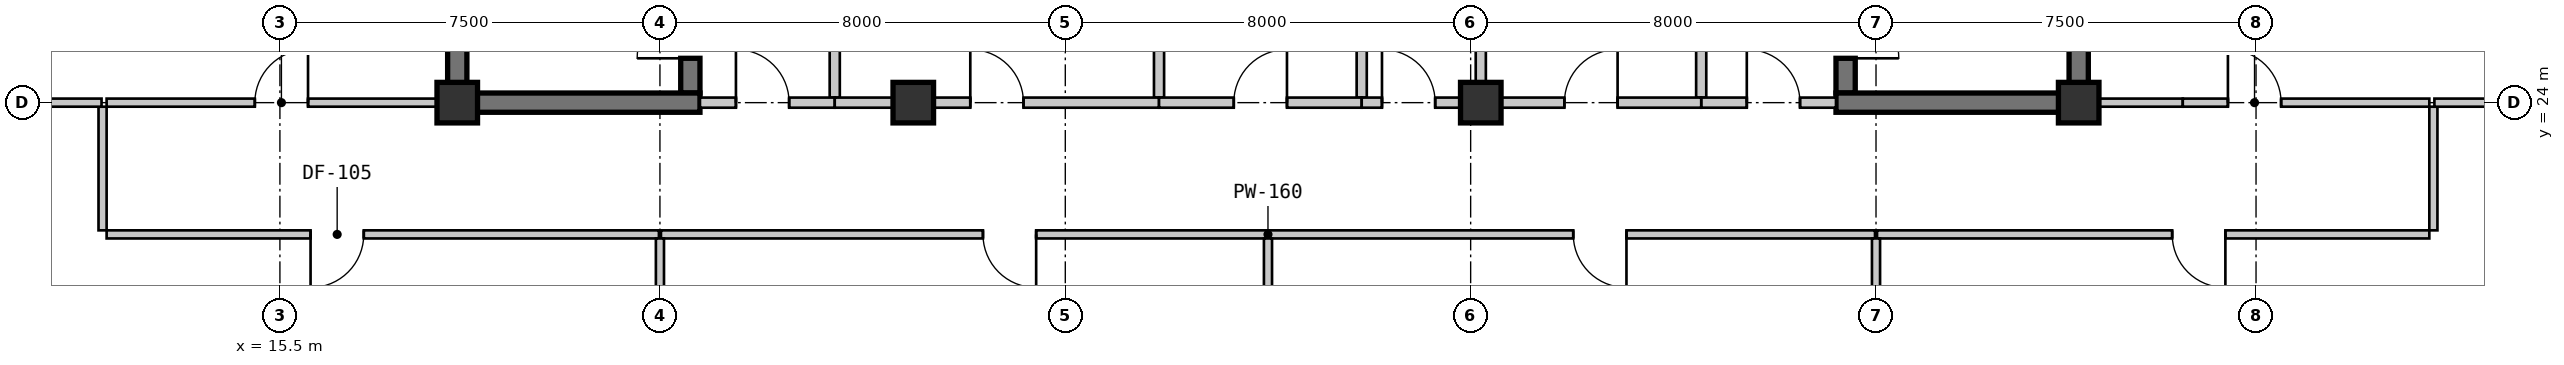
"""IFC4 building model, lengths in metres.
Left out: names, types, materials, properties, quantities, classifications, styles, units other than length and angle.
Written with IfcOpenShell. Run it as: python <this file> out.ifc"""

import sys

from ifc_helpers import new_model, si_unit, direction, frame, frame_2d, origin, origin_2d, place, context, subcontext, project, spatial, rectangle, extrude, source, transform, mapped, element, fill, save


model = new_model("IFC4")
c1 = context("Model", 3, precision=1e-05, world=origin(), true_north=direction((0.0, 1.0)))
c2 = subcontext(c1, "Body", "Model", "MODEL_VIEW")
j1 = project(units=[si_unit("LENGTHUNIT", "METRE"), si_unit("PLANEANGLEUNIT", "RADIAN")], contexts=[c1])
p1 = place(None, origin())
s1 = spatial("IfcSite", under=j1, at=p1, CompositionType="ELEMENT")
p2 = place(p1, origin())
s2 = spatial("IfcBuilding", under=s1, at=p2, CompositionType="ELEMENT")
p3 = place(p2, frame((0.0, 0.0, 60.9)))
s3 = spatial("IfcBuildingStorey", under=s2, at=p3, CompositionType="ELEMENT", Elevation=60.9)
m1 = source(origin(), c2, "Body", "SweptSolid", [
    extrude(rectangle(XDim=0.8, YDim=0.8, at=origin_2d()), origin(), (0.0, 0.0, 1.0), 4.2),
])
for number, where, z_axis, x_axis in (
    (1, (19.0, 24.0, 0.0), (0.0, 0.0, 1.0), (1.0, 0.0, 0.0)),
    (2, (28.0, 24.0, 0.0), (0.0, 0.0, 1.0), (1.0, 0.0, 0.0)),
    (3, (39.2, 24.0, 0.0), (0.0, 0.0, 1.0), (1.0, 0.0, 0.0)),
    (4, (51.0, 24.0, 0.0), (0.0, 0.0, 1.0), (1.0, 0.0, 0.0)),
):
    element("IfcColumn", number, at=place(p3, frame(where, z_axis=z_axis, x_axis=x_axis)), inside=s3, PredefinedType="COLUMN", context=c2, shape_type="MappedRepresentation", body=[
        mapped(m1, transform((0.0, 0.0, 0.0), scale=1.0)),
    ])
m2 = source(origin(), c2, "Body", "SweptSolid", [
    extrude(rectangle(XDim=4.01, YDim=0.38, at=frame_2d((2.005, 0.0))), origin(), (0.0, 0.0, 1.0), 3.78),
])
for number, where, z_axis, x_axis in (
    (5, (19.0, 24.19, 0.0), (0.0, 0.0, 1.0), (0.0, 1.0, 0.0)),
    (6, (51.0, 24.19, 0.0), (0.0, 0.0, 1.0), (0.0, 1.0, 0.0)),
):
    element("IfcWall", number, at=place(p3, frame(where, z_axis=z_axis, x_axis=x_axis)), inside=s3, PredefinedType="SHEAR", context=c2, shape_type="MappedRepresentation", body=[
        mapped(m2, transform((0.0, 0.0, 0.0), scale=1.0)),
    ])
m3 = source(origin(), c2, "Body", "SweptSolid", [
    extrude(rectangle(XDim=3.82, YDim=0.38, at=frame_2d((1.91, 0.0))), origin(), (0.0, 0.0, 1.0), 3.78),
])
p4 = place(p3, frame((23.6, 24.19, 0.0), z_axis=(0.0, 0.0, 1.0), x_axis=(0.0, 1.0, 0.0)))
e7 = element("IfcWall", 7, at=p4, inside=s3, PredefinedType="SHEAR", context=c2, shape_type="MappedRepresentation", body=[
    mapped(m3, transform((0.0, 0.0, 0.0), scale=1.0)),
])
m4 = source(origin(), c2, "Body", "SweptSolid", [
    extrude(rectangle(XDim=1.05, YDim=2.1, at=frame_2d((0.525, 1.05))), frame((0.0, 0.2, 0.0), z_axis=(0.0, -1.0, 0.0), x_axis=(1.0, 0.0, 0.0)), (0.0, 0.0, 1.0), 0.4),
])
p5 = place(p4, frame((0.685, 0.0, 0.0)))
e8 = element("IfcOpeningElement", 8, at=p5, cuts=e7, PredefinedType="OPENING", context=c2, shape_type="MappedRepresentation", body=[
    mapped(m4, transform((0.0, 0.0, 0.0), scale=1.0)),
])
m5 = source(origin(), c2, "Body", "SweptSolid", [
    extrude(rectangle(XDim=4.98, YDim=0.38, at=frame_2d((2.49, 0.0))), origin(), (0.0, 0.0, 1.0), 3.78),
])
p6 = place(p3, frame((18.81, 24.0, 0.0), z_axis=(0.0, 0.0, 1.0), x_axis=(1.0, 0.0, 0.0)))
e9 = element("IfcWall", 9, at=p6, inside=s3, PredefinedType="SHEAR", context=c2, shape_type="MappedRepresentation", body=[
    mapped(m5, transform((0.0, 0.0, 0.0), scale=1.0)),
])
m6 = source(origin(), c2, "Body", "SweptSolid", [
    extrude(rectangle(XDim=3.91, YDim=0.2, at=frame_2d((1.955, 0.0))), origin(), (0.0, 0.0, 1.0), 3.78),
])
p7 = place(p3, frame((26.45, 24.1, 0.0), z_axis=(0.0, 0.0, 1.0), x_axis=(0.0, 1.0, 0.0)))
e10 = element("IfcWall", 10, at=p7, inside=s3, PredefinedType="SOLIDWALL", context=c2, shape_type="MappedRepresentation", body=[
    mapped(m6, transform((0.0, 0.0, 0.0), scale=1.0)),
])
m7 = source(origin(), c2, "Body", "SweptSolid", [
    extrude(rectangle(XDim=2.66, YDim=0.2, at=frame_2d((1.33, 0.0))), origin(), (0.0, 0.0, 1.0), 3.32),
])
p8 = place(p3, frame((23.79, 24.0, 0.0), z_axis=(0.0, 0.0, 1.0), x_axis=(1.0, 0.0, 0.0)))
e11 = element("IfcWall", 11, at=p8, inside=s3, PredefinedType="SOLIDWALL", context=c2, shape_type="MappedRepresentation", body=[
    mapped(m7, transform((0.0, 0.0, 0.0), scale=1.0)),
])
m8 = source(origin(), c2, "Body", "SweptSolid", [
    extrude(rectangle(XDim=1.05, YDim=2.1, at=frame_2d((0.525, 1.05))), frame((0.0, 0.11, 0.0), z_axis=(0.0, -1.0, 0.0), x_axis=(1.0, 0.0, 0.0)), (0.0, 0.0, 1.0), 0.22),
])
p9 = place(p8, frame((0.71, 0.0, 0.0)))
e12 = element("IfcOpeningElement", 12, at=p9, cuts=e11, PredefinedType="OPENING", context=c2, shape_type="MappedRepresentation", body=[
    mapped(m8, transform((0.0, 0.0, 0.0), scale=1.0)),
])
p10 = place(p3, frame((46.4, 28.01, 0.0), z_axis=(0.0, 0.0, 1.0), x_axis=(0.0, -1.0, 0.0)))
e13 = element("IfcWall", 13, at=p10, inside=s3, PredefinedType="SHEAR", context=c2, shape_type="MappedRepresentation", body=[
    mapped(m3, transform((0.0, 0.0, 0.0), scale=1.0)),
])
p11 = place(p10, frame((2.085, 0.0, 0.0)))
e14 = element("IfcOpeningElement", 14, at=p11, cuts=e13, PredefinedType="OPENING", context=c2, shape_type="MappedRepresentation", body=[
    mapped(m4, transform((0.0, 0.0, 0.0), scale=1.0)),
])
p12 = place(p3, frame((46.21, 24.0, 0.0), z_axis=(0.0, 0.0, 1.0), x_axis=(1.0, 0.0, 0.0)))
e15 = element("IfcWall", 15, at=p12, inside=s3, PredefinedType="SHEAR", context=c2, shape_type="MappedRepresentation", body=[
    mapped(m5, transform((0.0, 0.0, 0.0), scale=1.0)),
])
p13 = place(p3, frame((43.55, 28.01, 0.0), z_axis=(0.0, 0.0, 1.0), x_axis=(0.0, -1.0, 0.0)))
e16 = element("IfcWall", 16, at=p13, inside=s3, PredefinedType="SOLIDWALL", context=c2, shape_type="MappedRepresentation", body=[
    mapped(m6, transform((0.0, 0.0, 0.0), scale=1.0)),
])
m9 = source(origin(), c2, "Body", "SweptSolid", [
    extrude(rectangle(XDim=2.66, YDim=0.2, at=frame_2d((1.33, 0.0))), origin(), (0.0, 0.0, 1.0), 3.247),
])
p14 = place(p3, frame((43.55, 24.0, 0.0), z_axis=(0.0, 0.0, 1.0), x_axis=(1.0, 0.0, 0.0)))
e17 = element("IfcWall", 17, at=p14, inside=s3, PredefinedType="SOLIDWALL", context=c2, shape_type="MappedRepresentation", body=[
    mapped(m9, transform((0.0, 0.0, 0.0), scale=1.0)),
])
p15 = place(p14, frame((0.9, 0.0, 0.0)))
e18 = element("IfcOpeningElement", 18, at=p15, cuts=e17, PredefinedType="OPENING", context=c2, shape_type="MappedRepresentation", body=[
    mapped(m8, transform((0.0, 0.0, 0.0), scale=1.0)),
])
p16 = place(p3, frame((32.85, 28.01, 0.0), z_axis=(0.0, 0.0, 1.0), x_axis=(0.0, -1.0, 0.0)))
e19 = element("IfcWall", 19, at=p16, inside=s3, PredefinedType="SOLIDWALL", context=c2, shape_type="MappedRepresentation", body=[
    mapped(m6, transform((0.0, 0.0, 0.0), scale=1.0)),
])
m10 = source(origin(), c2, "Body", "SweptSolid", [
    extrude(rectangle(XDim=6.4, YDim=0.2, at=frame_2d((3.2, 0.0))), origin(), (0.0, 0.0, 1.0), 3.32),
])
p17 = place(p3, frame((32.85, 24.0, 0.0), z_axis=(0.0, 0.0, 1.0), x_axis=(-1.0, 0.0, 0.0)))
e20 = element("IfcWall", 20, at=p17, inside=s3, PredefinedType="SOLIDWALL", context=c2, shape_type="MappedRepresentation", body=[
    mapped(m10, transform((0.0, 0.0, 0.0), scale=1.0)),
])
p18 = place(p17, frame((2.675, 0.0, 0.0)))
e21 = element("IfcOpeningElement", 21, at=p18, cuts=e20, PredefinedType="OPENING", context=c2, shape_type="MappedRepresentation", body=[
    mapped(m8, transform((0.0, 0.0, 0.0), scale=1.0)),
])
p19 = place(p3, frame((36.85, 28.01, 0.0), z_axis=(0.0, 0.0, 1.0), x_axis=(0.0, -1.0, 0.0)))
e22 = element("IfcWall", 22, at=p19, inside=s3, PredefinedType="SOLIDWALL", context=c2, shape_type="MappedRepresentation", body=[
    mapped(m6, transform((0.0, 0.0, 0.0), scale=1.0)),
])
m11 = source(origin(), c2, "Body", "SweptSolid", [
    extrude(rectangle(XDim=4.0, YDim=0.2, at=frame_2d((2.0, 0.0))), origin(), (0.0, 0.0, 1.0), 3.32),
])
p20 = place(p3, frame((36.85, 24.0, 0.0), z_axis=(0.0, 0.0, 1.0), x_axis=(-1.0, 0.0, 0.0)))
e23 = element("IfcWall", 23, at=p20, inside=s3, PredefinedType="SOLIDWALL", context=c2, shape_type="MappedRepresentation", body=[
    mapped(m11, transform((0.0, 0.0, 0.0), scale=1.0)),
])
p21 = place(p20, frame((1.475, 0.0, 0.0)))
e24 = element("IfcOpeningElement", 24, at=p21, cuts=e23, PredefinedType="OPENING", context=c2, shape_type="MappedRepresentation", body=[
    mapped(m8, transform((0.0, 0.0, 0.0), scale=1.0)),
])
m12 = source(origin(), c2, "Body", "SweptSolid", [
    extrude(rectangle(XDim=3.91, YDim=0.2, at=frame_2d((1.955, 0.0))), origin(), (0.0, 0.0, 1.0), 3.32),
])
p22 = place(p3, frame((39.2, 28.01, 0.0), z_axis=(0.0, 0.0, 1.0), x_axis=(0.0, -1.0, 0.0)))
e25 = element("IfcWall", 25, at=p22, inside=s3, PredefinedType="SOLIDWALL", context=c2, shape_type="MappedRepresentation", body=[
    mapped(m12, transform((0.0, 0.0, 0.0), scale=1.0)),
])
m13 = source(origin(), c2, "Body", "SweptSolid", [
    extrude(rectangle(XDim=2.35, YDim=0.2, at=frame_2d((1.175, 0.0))), origin(), (0.0, 0.0, 1.0), 3.32),
])
p23 = place(p3, frame((39.2, 24.0, 0.0), z_axis=(0.0, 0.0, 1.0), x_axis=(-1.0, 0.0, 0.0)))
e26 = element("IfcWall", 26, at=p23, inside=s3, PredefinedType="SOLIDWALL", context=c2, shape_type="MappedRepresentation", body=[
    mapped(m13, transform((0.0, 0.0, 0.0), scale=1.0)),
])
p24 = place(p23, frame((0.9, 0.0, 0.0)))
e27 = element("IfcOpeningElement", 27, at=p24, cuts=e26, PredefinedType="OPENING", context=c2, shape_type="MappedRepresentation", body=[
    mapped(m8, transform((0.0, 0.0, 0.0), scale=1.0)),
])
m14 = source(origin(), c2, "Body", "SweptSolid", [
    extrude(rectangle(XDim=4.35, YDim=0.2, at=frame_2d((2.175, 0.0))), origin(), (0.0, 0.0, 1.0), 3.247),
])
p25 = place(p3, frame((43.55, 24.0, 0.0), z_axis=(0.0, 0.0, 1.0), x_axis=(-1.0, 0.0, 0.0)))
e28 = element("IfcWall", 28, at=p25, inside=s3, PredefinedType="SOLIDWALL", context=c2, shape_type="MappedRepresentation", body=[
    mapped(m14, transform((0.0, 0.0, 0.0), scale=1.0)),
])
p26 = place(p25, frame((1.65, 0.0, 0.0)))
e29 = element("IfcOpeningElement", 29, at=p26, cuts=e28, PredefinedType="OPENING", context=c2, shape_type="MappedRepresentation", body=[
    mapped(m8, transform((0.0, 0.0, 0.0), scale=1.0)),
])
m15 = source(origin(), c2, "Body", "SweptSolid", [
    extrude(rectangle(XDim=6.73, YDim=0.16, at=frame_2d((3.365, 0.0))), origin(), (0.0, 0.0, 1.0), 3.78),
])
p27 = place(p3, frame((12.08, 24.0, 0.0), z_axis=(0.0, 0.0, 1.0), x_axis=(1.0, 0.0, 0.0)))
e30 = element("IfcWall", 30, at=p27, inside=s3, PredefinedType="PARTITIONING", context=c2, shape_type="MappedRepresentation", body=[
    mapped(m15, transform((0.0, 0.0, 0.0), scale=1.0)),
])
m16 = source(origin(), c2, "Body", "SweptSolid", [
    extrude(rectangle(XDim=1.05, YDim=2.1, at=frame_2d((0.525, 1.05))), frame((0.0, 0.09, 0.0), z_axis=(0.0, -1.0, 0.0), x_axis=(1.0, 0.0, 0.0)), (0.0, 0.0, 1.0), 0.18),
])
p28 = place(p27, frame((2.925, 0.0, 0.0)))
e31 = element("IfcOpeningElement", 31, at=p28, cuts=e30, PredefinedType="OPENING", context=c2, shape_type="MappedRepresentation", body=[
    mapped(m16, transform((0.0, 0.0, 0.0), scale=1.0)),
])
m17 = source(origin(), c2, "Body", "SweptSolid", [
    extrude(rectangle(XDim=1.865, YDim=0.16, at=frame_2d((0.932, 0.0))), origin(), (0.0, 0.0, 1.0), 2.28),
])
p29 = place(p3, frame((51.19, 24.0, 0.0), z_axis=(0.0, 0.0, 1.0), x_axis=(1.0, 0.0, 0.0)))
e32 = element("IfcWall", 32, at=p29, inside=s3, PredefinedType="PARTITIONING", context=c2, shape_type="MappedRepresentation", body=[
    mapped(m17, transform((0.0, 0.0, 0.0), scale=1.0)),
])
m18 = source(origin(), c2, "Body", "SweptSolid", [
    extrude(rectangle(XDim=4.865, YDim=0.16, at=frame_2d((2.433, 0.0))), origin(), (0.0, 0.0, 1.0), 3.78),
])
p30 = place(p3, frame((53.054, 24.0, 0.0), z_axis=(0.0, 0.0, 1.0), x_axis=(1.0, 0.0, 0.0)))
e33 = element("IfcWall", 33, at=p30, inside=s3, PredefinedType="PARTITIONING", context=c2, shape_type="MappedRepresentation", body=[
    mapped(m18, transform((0.0, 0.0, 0.0), scale=1.0)),
])
p31 = place(p30, frame((0.891, 0.0, 0.0)))
e34 = element("IfcOpeningElement", 34, at=p31, cuts=e33, PredefinedType="OPENING", context=c2, shape_type="MappedRepresentation", body=[
    mapped(m16, transform((0.0, 0.0, 0.0), scale=1.0)),
])
m19 = source(origin(), c2, "Body", "SweptSolid", [
    extrude(rectangle(XDim=10.9, YDim=0.16, at=frame_2d((5.45, 0.0))), origin(), (0.0, 0.0, 1.0), 3.78),
])
p32 = place(p3, frame((22.98, 21.4, 0.0), z_axis=(0.0, 0.0, 1.0), x_axis=(-1.0, 0.0, 0.0)))
e35 = element("IfcWall", 35, at=p32, inside=s3, PredefinedType="PARTITIONING", context=c2, shape_type="MappedRepresentation", body=[
    mapped(m19, transform((0.0, 0.0, 0.0), scale=1.0)),
])
p33 = place(p32, frame((5.825, 0.0, 0.0)))
e36 = element("IfcOpeningElement", 36, at=p33, cuts=e35, PredefinedType="OPENING", context=c2, shape_type="MappedRepresentation", body=[
    mapped(m16, transform((0.0, 0.0, 0.0), scale=1.0)),
])
m20 = source(origin(), c2, "Body", "SweptSolid", [
    extrude(rectangle(XDim=2.44, YDim=0.16, at=frame_2d((1.22, 0.0))), origin(), (0.0, 0.0, 1.0), 3.78),
])
p34 = place(p3, frame((12.0, 21.48, 0.0), z_axis=(0.0, 0.0, 1.0), x_axis=(0.0, 1.0, 0.0)))
e37 = element("IfcWall", 37, at=p34, inside=s3, PredefinedType="PARTITIONING", context=c2, shape_type="MappedRepresentation", body=[
    mapped(m20, transform((0.0, 0.0, 0.0), scale=1.0)),
])
m21 = source(origin(), c2, "Body", "SweptSolid", [
    extrude(rectangle(XDim=11.959, YDim=0.16, at=frame_2d((5.98, 0.0))), origin(), (0.0, 0.0, 1.0), 3.78),
])
p35 = place(p3, frame((34.98, 21.4, 0.0), z_axis=(0.0, 0.0, 1.0), x_axis=(-1.0, 0.0, 0.0)))
e38 = element("IfcWall", 38, at=p35, inside=s3, PredefinedType="PARTITIONING", context=c2, shape_type="MappedRepresentation", body=[
    mapped(m21, transform((0.0, 0.0, 0.0), scale=1.0)),
])
p36 = place(p35, frame((4.555, 0.0, 0.0)))
e39 = element("IfcOpeningElement", 39, at=p36, cuts=e38, PredefinedType="OPENING", context=c2, shape_type="MappedRepresentation", body=[
    mapped(m16, transform((0.0, 0.0, 0.0), scale=1.0)),
])
p37 = place(p3, frame((46.98, 21.4, 0.0), z_axis=(0.0, 0.0, 1.0), x_axis=(-1.0, 0.0, 0.0)))
e40 = element("IfcWall", 40, at=p37, inside=s3, PredefinedType="PARTITIONING", context=c2, shape_type="MappedRepresentation", body=[
    mapped(m21, transform((0.0, 0.0, 0.0), scale=1.0)),
])
p38 = place(p37, frame((4.905, 0.0, 0.0)))
e41 = element("IfcOpeningElement", 41, at=p38, cuts=e40, PredefinedType="OPENING", context=c2, shape_type="MappedRepresentation", body=[
    mapped(m16, transform((0.0, 0.0, 0.0), scale=1.0)),
])
p39 = place(p3, frame((57.92, 21.4, 0.0), z_axis=(0.0, 0.0, 1.0), x_axis=(-1.0, 0.0, 0.0)))
e42 = element("IfcWall", 42, at=p39, inside=s3, PredefinedType="PARTITIONING", context=c2, shape_type="MappedRepresentation", body=[
    mapped(m19, transform((0.0, 0.0, 0.0), scale=1.0)),
])
p40 = place(p39, frame((4.025, 0.0, 0.0)))
e43 = element("IfcOpeningElement", 43, at=p40, cuts=e42, PredefinedType="OPENING", context=c2, shape_type="MappedRepresentation", body=[
    mapped(m16, transform((0.0, 0.0, 0.0), scale=1.0)),
])
p41 = place(p3, frame((58.0, 23.92, 0.0), z_axis=(0.0, 0.0, 1.0), x_axis=(0.0, -1.0, 0.0)))
e44 = element("IfcWall", 44, at=p41, inside=s3, PredefinedType="PARTITIONING", context=c2, shape_type="MappedRepresentation", body=[
    mapped(m20, transform((0.0, 0.0, 0.0), scale=1.0)),
])
m22 = source(origin(), c2, "Body", "SweptSolid", [
    extrude(rectangle(XDim=6.75, YDim=0.16, at=frame_2d((3.375, 0.0))), origin(), (0.0, 0.0, 1.0), 3.78),
])
for number, where, z_axis, x_axis in (
    (45, (11.98, 24.0, 0.0), (0.0, 0.0, 1.0), (-1.0, 0.0, 0.0)),
    (46, (64.77, 24.0, 0.0), (0.0, 0.0, 1.0), (-1.0, 0.0, 0.0)),
):
    element("IfcWall", number, at=place(p3, frame(where, z_axis=z_axis, x_axis=x_axis)), inside=s3, PredefinedType="PARTITIONING", context=c2, shape_type="MappedRepresentation", body=[
        mapped(m22, transform((0.0, 0.0, 0.0), scale=1.0)),
    ])
m23 = source(origin(), c2, "Body", "SweptSolid", [
    extrude(rectangle(XDim=19.59, YDim=0.16, at=frame_2d((9.795, 0.0))), origin(), (0.0, 0.0, 1.0), 3.78),
])
for number, where, z_axis, x_axis in (
    (47, (23.0, 21.32, 0.0), (0.0, 0.0, 1.0), (0.0, -1.0, 0.0)),
    (48, (35.0, 21.32, 0.0), (0.0, 0.0, 1.0), (0.0, -1.0, 0.0)),
    (49, (47.0, 21.32, 0.0), (0.0, 0.0, 1.0), (0.0, -1.0, 0.0)),
):
    element("IfcWall", number, at=place(p3, frame(where, z_axis=z_axis, x_axis=x_axis)), inside=s3, PredefinedType="PARTITIONING", context=c2, shape_type="MappedRepresentation", body=[
        mapped(m23, transform((0.0, 0.0, 0.0), scale=1.0)),
    ])
m24 = source(origin(), c2, "Body", "SweptSolid", [
    extrude(rectangle(XDim=1.05, YDim=2.1, at=frame_2d((0.525, 1.05))), frame((0.0, 0.025, 0.0), z_axis=(0.0, -1.0, 0.0), x_axis=(1.0, 0.0, 0.0)), (0.0, 0.0, 1.0), 0.05),
])
p42 = place(p5, origin())
e50 = element("IfcDoor", 50, at=p42, inside=s3, OperationType="SINGLE_SWING_LEFT", PredefinedType="DOOR", context=c2, shape_type="MappedRepresentation", body=[
    mapped(m24, transform((0.0, 0.0, 0.0), scale=1.0)),
])
fill(e8, e50)
p43 = place(p9, origin())
e51 = element("IfcDoor", 51, at=p43, inside=s3, OperationType="SINGLE_SWING_LEFT", PredefinedType="DOOR", context=c2, shape_type="MappedRepresentation", body=[
    mapped(m24, transform((0.0, 0.0, 0.0), scale=1.0)),
])
fill(e12, e51)
p44 = place(p11, origin())
e52 = element("IfcDoor", 52, at=p44, inside=s3, OperationType="SINGLE_SWING_RIGHT", PredefinedType="DOOR", context=c2, shape_type="MappedRepresentation", body=[
    mapped(m24, transform((0.0, 0.0, 0.0), scale=1.0)),
])
fill(e14, e52)
p45 = place(p15, origin())
e53 = element("IfcDoor", 53, at=p45, inside=s3, OperationType="SINGLE_SWING_LEFT", PredefinedType="DOOR", context=c2, shape_type="MappedRepresentation", body=[
    mapped(m24, transform((0.0, 0.0, 0.0), scale=1.0)),
])
fill(e18, e53)
p46 = place(p18, frame((1.05, 0.0, 0.0), z_axis=(0.0, 0.0, 1.0), x_axis=(-1.0, 0.0, 0.0)))
e54 = element("IfcDoor", 54, at=p46, inside=s3, OperationType="SINGLE_SWING_LEFT", PredefinedType="DOOR", context=c2, shape_type="MappedRepresentation", body=[
    mapped(m24, transform((0.0, 0.0, 0.0), scale=1.0)),
])
fill(e21, e54)
p47 = place(p21, frame((1.05, 0.0, 0.0), z_axis=(0.0, 0.0, 1.0), x_axis=(-1.0, 0.0, 0.0)))
e55 = element("IfcDoor", 55, at=p47, inside=s3, OperationType="SINGLE_SWING_RIGHT", PredefinedType="DOOR", context=c2, shape_type="MappedRepresentation", body=[
    mapped(m24, transform((0.0, 0.0, 0.0), scale=1.0)),
])
fill(e24, e55)
p48 = place(p24, frame((1.05, 0.0, 0.0), z_axis=(0.0, 0.0, 1.0), x_axis=(-1.0, 0.0, 0.0)))
e56 = element("IfcDoor", 56, at=p48, inside=s3, OperationType="SINGLE_SWING_LEFT", PredefinedType="DOOR", context=c2, shape_type="MappedRepresentation", body=[
    mapped(m24, transform((0.0, 0.0, 0.0), scale=1.0)),
])
fill(e27, e56)
p49 = place(p26, frame((1.05, 0.0, 0.0), z_axis=(0.0, 0.0, 1.0), x_axis=(-1.0, 0.0, 0.0)))
e57 = element("IfcDoor", 57, at=p49, inside=s3, OperationType="SINGLE_SWING_RIGHT", PredefinedType="DOOR", context=c2, shape_type="MappedRepresentation", body=[
    mapped(m24, transform((0.0, 0.0, 0.0), scale=1.0)),
])
fill(e29, e57)
p50 = place(p28, origin())
e58 = element("IfcDoor", 58, at=p50, inside=s3, OperationType="SINGLE_SWING_RIGHT", PredefinedType="DOOR", context=c2, shape_type="MappedRepresentation", body=[
    mapped(m24, transform((0.0, 0.0, 0.0), scale=1.0)),
])
fill(e31, e58)
p51 = place(p31, origin())
e59 = element("IfcDoor", 59, at=p51, inside=s3, OperationType="SINGLE_SWING_LEFT", PredefinedType="DOOR", context=c2, shape_type="MappedRepresentation", body=[
    mapped(m24, transform((0.0, 0.0, 0.0), scale=1.0)),
])
fill(e34, e59)
p52 = place(p33, origin())
e60 = element("IfcDoor", 60, at=p52, inside=s3, OperationType="SINGLE_SWING_RIGHT", PredefinedType="DOOR", context=c2, shape_type="MappedRepresentation", body=[
    mapped(m24, transform((0.0, 0.0, 0.0), scale=1.0)),
])
fill(e36, e60)
p53 = place(p36, origin())
e61 = element("IfcDoor", 61, at=p53, inside=s3, OperationType="SINGLE_SWING_LEFT", PredefinedType="DOOR", context=c2, shape_type="MappedRepresentation", body=[
    mapped(m24, transform((0.0, 0.0, 0.0), scale=1.0)),
])
fill(e39, e61)
p54 = place(p38, origin())
e62 = element("IfcDoor", 62, at=p54, inside=s3, OperationType="SINGLE_SWING_LEFT", PredefinedType="DOOR", context=c2, shape_type="MappedRepresentation", body=[
    mapped(m24, transform((0.0, 0.0, 0.0), scale=1.0)),
])
fill(e41, e62)
p55 = place(p40, origin())
e63 = element("IfcDoor", 63, at=p55, inside=s3, OperationType="SINGLE_SWING_LEFT", PredefinedType="DOOR", context=c2, shape_type="MappedRepresentation", body=[
    mapped(m24, transform((0.0, 0.0, 0.0), scale=1.0)),
])
fill(e43, e63)
save(model, sys.argv[1])
